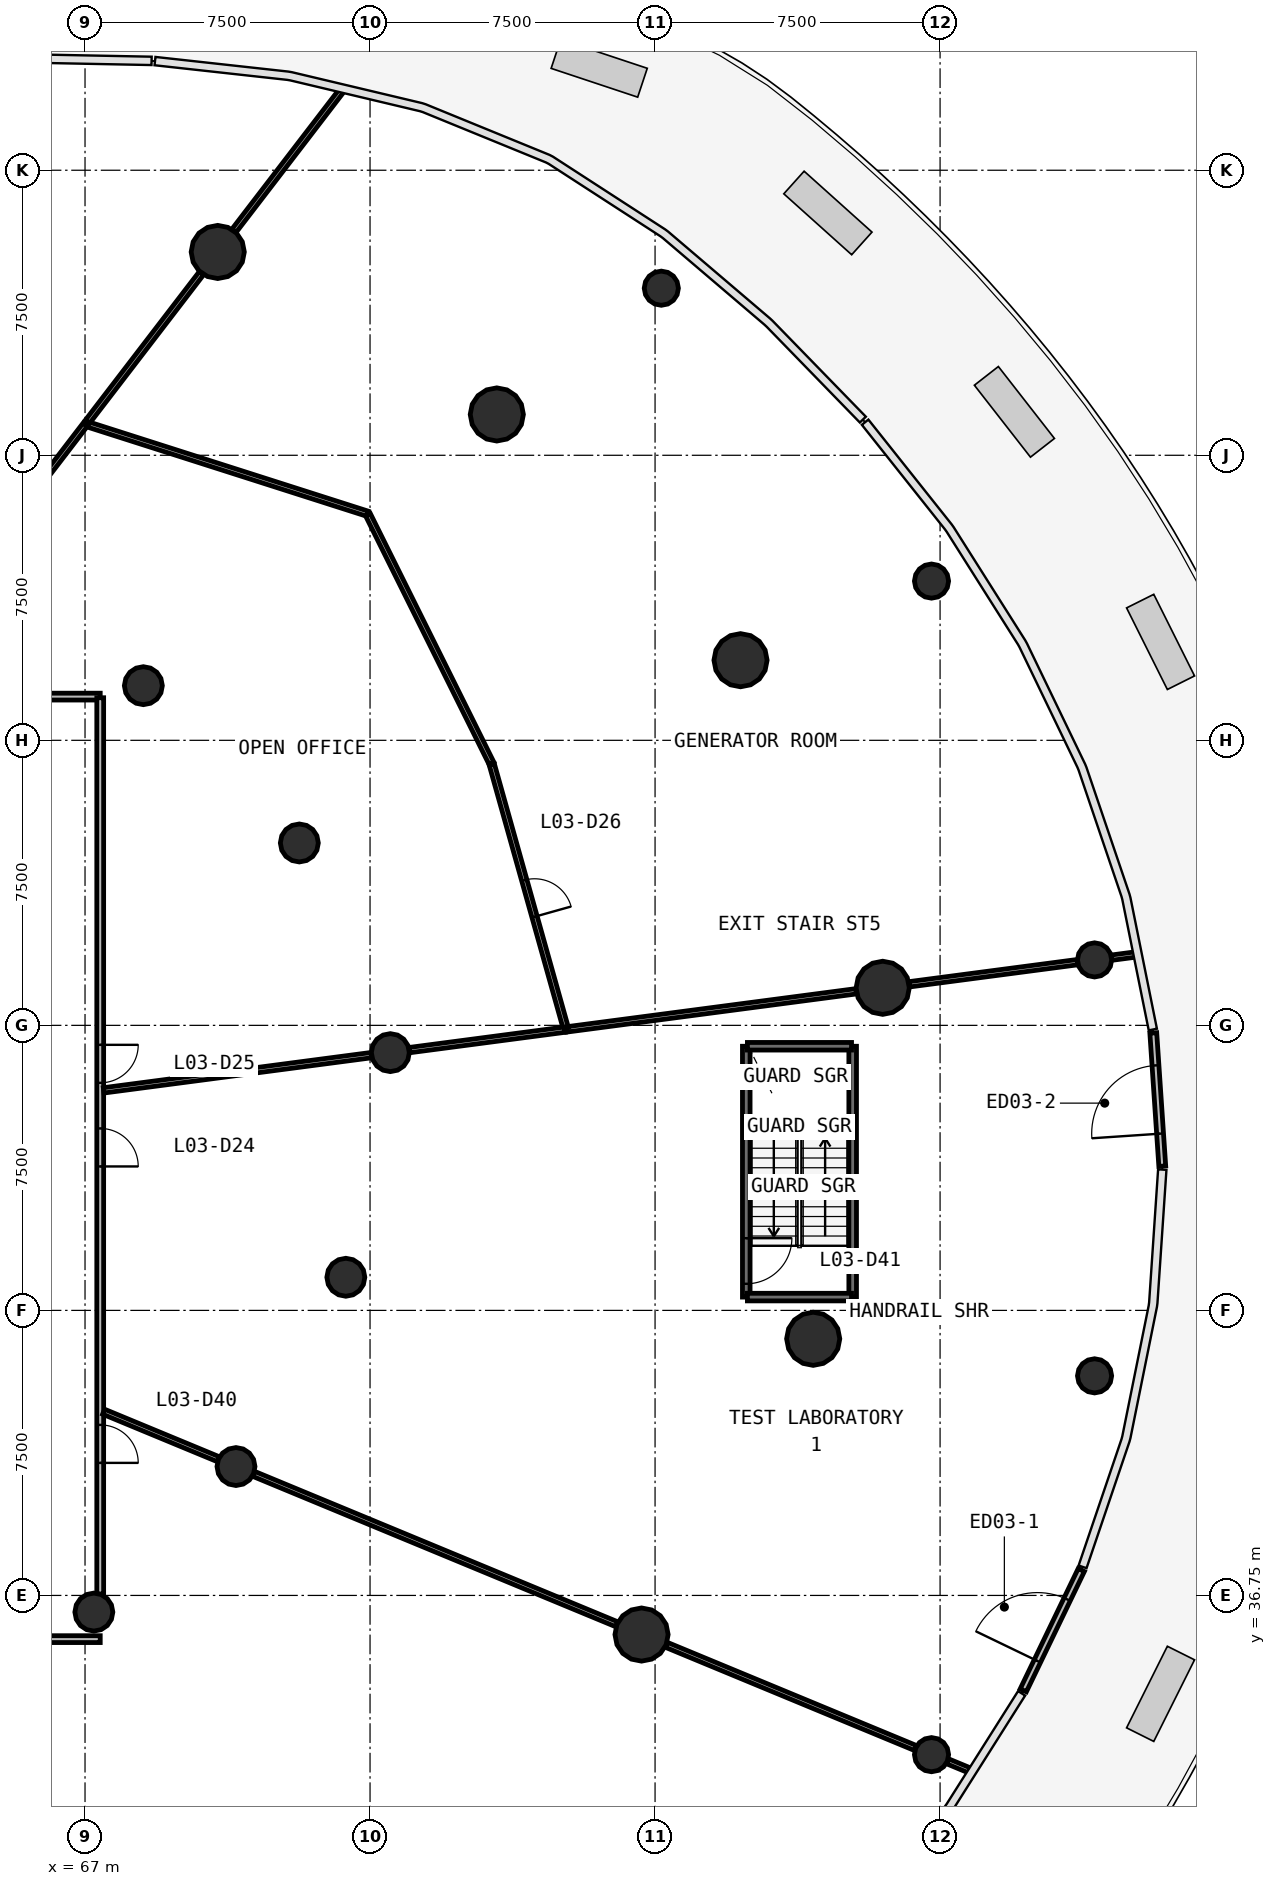
"""IFC4 building model, lengths in metres.
Left out: names, types, materials, properties, quantities, classifications, styles, units other than length and angle.
Written with IfcOpenShell. Run it as: python <this file> out.ifc"""

import sys

from ifc_helpers import new_model, si_unit, direction, frame, frame_2d, origin, origin_2d, place, context, subcontext, project, spatial, rectangle, circle, extrude, source, transform, mapped, element, fill, save


model = new_model("IFC4")
c1 = context("Model", 3, precision=1e-05, world=origin(), true_north=direction((0.0, 1.0)))
c2 = subcontext(c1, "Body", "Model", "MODEL_VIEW")
j1 = project(units=[si_unit("LENGTHUNIT", "METRE"), si_unit("PLANEANGLEUNIT", "RADIAN")], contexts=[c1])
p1 = place(None, origin())
s1 = spatial("IfcSite", under=j1, at=p1, CompositionType="ELEMENT")
p2 = place(p1, origin())
s2 = spatial("IfcBuilding", under=s1, at=p2, CompositionType="ELEMENT")
p3 = place(p2, frame((0.0, 0.0, 13.8)))
s3 = spatial("IfcBuildingStorey", under=s2, at=p3, CompositionType="ELEMENT", Elevation=13.8)
m1 = source(origin(), c2, "Body", "SweptSolid", [
    extrude(circle(Radius=0.7, at=origin_2d()), origin(), (0.0, 0.0, 1.0), 4.4),
])
for number, where, z_axis, x_axis in (
    (1, (87.99, 52.738, 0.0), (0.0, 0.0, 1.0), (1.0, 0.0, 0.0)),
    (2, (84.249, 61.358, 0.0), (0.0, 0.0, 1.0), (1.0, 0.0, 0.0)),
    (3, (77.836, 67.824, 0.0), (0.0, 0.0, 1.0), (1.0, 0.0, 0.0)),
    (4, (70.492, 72.1, 0.0), (0.0, 0.0, 1.0), (1.0, 0.0, 0.0)),
    (5, (81.645, 35.721, 0.0), (0.0, 0.0, 1.0), (1.0, 0.0, 0.0)),
    (6, (86.161, 43.503, 0.0), (0.0, 0.0, 1.0), (1.0, 0.0, 0.0)),
):
    element("IfcColumn", number, at=place(p3, frame(where, z_axis=z_axis, x_axis=x_axis)), inside=s3, PredefinedType="COLUMN", context=c2, shape_type="MappedRepresentation", body=[
        mapped(m1, transform((0.0, 0.0, 0.0), scale=1.0)),
    ])
m2 = source(origin(), c2, "Body", "SweptSolid", [
    extrude(circle(Radius=0.5, at=origin_2d()), origin(), (0.0, 0.0, 1.0), 4.4),
])
for number, where, z_axis, x_axis in (
    (7, (75.034, 51.032, 0.0), (0.0, 0.0, 1.0), (1.0, 0.0, 0.0)),
    (8, (72.639, 56.549, 0.0), (0.0, 0.0, 1.0), (1.0, 0.0, 0.0)),
    (9, (68.535, 60.688, 0.0), (0.0, 0.0, 1.0), (1.0, 0.0, 0.0)),
    (10, (67.232, 36.312, 0.0), (0.0, 0.0, 1.0), (1.0, 0.0, 0.0)),
    (11, (70.972, 40.141, 0.0), (0.0, 0.0, 1.0), (1.0, 0.0, 0.0)),
    (12, (73.863, 45.122, 0.0), (0.0, 0.0, 1.0), (1.0, 0.0, 0.0)),
):
    element("IfcColumn", number, at=place(p3, frame(where, z_axis=z_axis, x_axis=x_axis)), inside=s3, PredefinedType="COLUMN", context=c2, shape_type="MappedRepresentation", body=[
        mapped(m2, transform((0.0, 0.0, 0.0), scale=1.0)),
    ])
m3 = source(origin(), c2, "Body", "SweptSolid", [
    extrude(circle(Radius=0.45, at=origin_2d()), origin(), (0.0, 0.0, 1.0), 4.05),
])
for number, where, z_axis, x_axis in (
    (13, (93.565, 53.472, 0.0), (0.0, 0.0, 1.0), (1.0, 0.0, 0.0)),
    (14, (89.275, 63.44, 0.0), (0.0, 0.0, 1.0), (1.0, 0.0, 0.0)),
    (15, (82.165, 71.146, 0.0), (0.0, 0.0, 1.0), (1.0, 0.0, 0.0)),
    (16, (89.275, 32.56, 0.0), (0.0, 0.0, 1.0), (1.0, 0.0, 0.0)),
    (17, (93.565, 42.528, 0.0), (0.0, 0.0, 1.0), (1.0, 0.0, 0.0)),
):
    element("IfcColumn", number, at=place(p3, frame(where, z_axis=z_axis, x_axis=x_axis)), inside=s3, PredefinedType="COLUMN", context=c2, shape_type="MappedRepresentation", body=[
        mapped(m3, transform((0.0, 0.0, 0.0), scale=1.0)),
    ])
p4 = place(p3, frame((95.347, 48.045, 0.0), z_axis=(0.0, 0.0, 1.0), x_axis=(-0.06732600061, 0.99773103071, 0.0)))
e18 = element("IfcWall", 18, at=p4, inside=s3, PredefinedType="STANDARD", context=c2, shape_type="SweptSolid", body=[
    extrude(rectangle(XDim=3.514, YDim=0.18, at=frame_2d((1.757, 0.0))), origin(), (0.0, 0.0, 1.0), 4.05),
])
p5 = place(p4, frame((0.857, 0.0, 0.0)))
e19 = element("IfcOpeningElement", 19, at=p5, cuts=e18, PredefinedType="OPENING", context=c2, shape_type="SweptSolid", body=[
    extrude(rectangle(XDim=1.8, YDim=2.4, at=frame_2d((0.9, 1.2))), frame((0.0, 0.1, 0.0), z_axis=(0.0, -1.0, 0.0), x_axis=(1.0, 0.0, 0.0)), (0.0, 0.0, 1.0), 0.2),
])
p6 = place(p3, frame((91.689, 34.253, 0.0), z_axis=(0.0, 0.0, 1.0), x_axis=(0.434302205142, 0.900767225541, 0.0)))
e20 = element("IfcWall", 20, at=p6, inside=s3, PredefinedType="STANDARD", context=c2, shape_type="SweptSolid", body=[
    extrude(rectangle(XDim=3.515, YDim=0.18, at=frame_2d((1.757, 0.0))), origin(), (0.0, 0.0, 1.0), 4.05),
])
p7 = place(p6, frame((0.857, 0.0, 0.0)))
e21 = element("IfcOpeningElement", 21, at=p7, cuts=e20, PredefinedType="OPENING", context=c2, shape_type="SweptSolid", body=[
    extrude(rectangle(XDim=1.8, YDim=2.4, at=frame_2d((0.9, 1.2))), frame((0.0, 0.1, 0.0), z_axis=(0.0, -1.0, 0.0), x_axis=(1.0, 0.0, 0.0)), (0.0, 0.0, 1.0), 0.2),
])
p8 = place(p3, frame((87.2, 44.6, 0.0), z_axis=(0.0, 0.0, 1.0), x_axis=(0.0, 1.0, 0.0)))
e22 = element("IfcWall", 22, at=p8, inside=s3, PredefinedType="SOLIDWALL", context=c2, shape_type="SweptSolid", body=[
    extrude(rectangle(XDim=6.6, YDim=0.2, at=frame_2d((3.3, 0.0))), origin(), (0.0, 0.0, 1.0), 4.05),
])
p9 = place(p3, frame((84.4, 51.2, 0.0), z_axis=(0.0, 0.0, 1.0), x_axis=(0.0, -1.0, 0.0)))
e23 = element("IfcWall", 23, at=p9, inside=s3, PredefinedType="SOLIDWALL", context=c2, shape_type="SweptSolid", body=[
    extrude(rectangle(XDim=6.6, YDim=0.2, at=frame_2d((3.3, 0.0))), origin(), (0.0, 0.0, 1.0), 4.05),
])
p10 = place(p9, frame((5.05, 0.0, 0.0)))
e24 = element("IfcOpeningElement", 24, at=p10, cuts=e23, PredefinedType="OPENING", context=c2, shape_type="SweptSolid", body=[
    extrude(rectangle(XDim=1.2, YDim=2.1, at=frame_2d((0.6, 1.05))), frame((0.0, 0.11, 0.0), z_axis=(0.0, -1.0, 0.0), x_axis=(1.0, 0.0, 0.0)), (0.0, 0.0, 1.0), 0.22),
])
for number, where, z_axis, x_axis in (
    (25, (84.43, 44.6, 0.0), (0.0, 0.0, 1.0), (1.0, 0.0, 0.0)),
    (26, (87.17, 51.2, 0.0), (0.0, 0.0, 1.0), (-1.0, 0.0, 0.0)),
):
    element("IfcWall", number, at=place(p3, frame(where, z_axis=z_axis, x_axis=x_axis)), inside=s3, PredefinedType="SOLIDWALL", context=c2, shape_type="SweptSolid", body=[
        extrude(rectangle(XDim=2.74, YDim=0.2, at=frame_2d((1.37, 0.0))), origin(), (0.0, 0.0, 1.0), 4.05),
    ])
p11 = place(p3, frame((67.4, 35.6, 0.0), z_axis=(0.0, 0.0, 1.0), x_axis=(-1.0, 0.0, 0.0)))
e27 = element("IfcWall", 27, at=p11, inside=s3, PredefinedType="PARTITIONING", context=c2, shape_type="SweptSolid", body=[
    extrude(rectangle(XDim=30.8, YDim=0.18, at=frame_2d((15.4, 0.0))), origin(), (0.0, 0.0, 1.0), 3.25),
])
p12 = place(p11, frame((20.95, 0.0, 0.0)))
e28 = element("IfcOpeningElement", 28, at=p12, cuts=e27, PredefinedType="OPENING", context=c2, shape_type="SweptSolid", body=[
    extrude(rectangle(XDim=1.0, YDim=2.1, at=frame_2d((0.5, 1.05))), frame((0.0, 0.1, 0.0), z_axis=(0.0, -1.0, 0.0), x_axis=(1.0, 0.0, 0.0)), (0.0, 0.0, 1.0), 0.2),
])
p13 = place(p11, frame((17.35, 0.0, 0.0)))
e29 = element("IfcOpeningElement", 29, at=p13, cuts=e27, PredefinedType="OPENING", context=c2, shape_type="SweptSolid", body=[
    extrude(rectangle(XDim=1.0, YDim=2.1, at=frame_2d((0.5, 1.05))), frame((0.0, 0.1, 0.0), z_axis=(0.0, -1.0, 0.0), x_axis=(1.0, 0.0, 0.0)), (0.0, 0.0, 1.0), 0.2),
])
p14 = place(p11, frame((14.95, 0.0, 0.0)))
e30 = element("IfcOpeningElement", 30, at=p14, cuts=e27, PredefinedType="OPENING", context=c2, shape_type="SweptSolid", body=[
    extrude(rectangle(XDim=1.0, YDim=2.1, at=frame_2d((0.5, 1.05))), frame((0.0, 0.1, 0.0), z_axis=(0.0, -1.0, 0.0), x_axis=(1.0, 0.0, 0.0)), (0.0, 0.0, 1.0), 0.2),
])
p15 = place(p3, frame((36.6, 60.4, 0.0), z_axis=(0.0, 0.0, 1.0), x_axis=(1.0, 0.0, 0.0)))
e31 = element("IfcWall", 31, at=p15, inside=s3, PredefinedType="PARTITIONING", context=c2, shape_type="SweptSolid", body=[
    extrude(rectangle(XDim=30.8, YDim=0.18, at=frame_2d((15.4, 0.0))), origin(), (0.0, 0.0, 1.0), 3.25),
])
p16 = place(p15, frame((17.35, 0.0, 0.0)))
e32 = element("IfcOpeningElement", 32, at=p16, cuts=e31, PredefinedType="OPENING", context=c2, shape_type="SweptSolid", body=[
    extrude(rectangle(XDim=1.0, YDim=2.1, at=frame_2d((0.5, 1.05))), frame((0.0, 0.1, 0.0), z_axis=(0.0, -1.0, 0.0), x_axis=(1.0, 0.0, 0.0)), (0.0, 0.0, 1.0), 0.2),
])
p17 = place(p15, frame((14.85, 0.0, 0.0)))
e33 = element("IfcOpeningElement", 33, at=p17, cuts=e31, PredefinedType="OPENING", context=c2, shape_type="SweptSolid", body=[
    extrude(rectangle(XDim=0.9, YDim=2.1, at=frame_2d((0.45, 1.05))), frame((0.0, 0.1, 0.0), z_axis=(0.0, -1.0, 0.0), x_axis=(1.0, 0.0, 0.0)), (0.0, 0.0, 1.0), 0.2),
])
p18 = place(p15, frame((12.65, 0.0, 0.0)))
e34 = element("IfcOpeningElement", 34, at=p18, cuts=e31, PredefinedType="OPENING", context=c2, shape_type="SweptSolid", body=[
    extrude(rectangle(XDim=0.9, YDim=2.1, at=frame_2d((0.45, 1.05))), frame((0.0, 0.1, 0.0), z_axis=(0.0, -1.0, 0.0), x_axis=(1.0, 0.0, 0.0)), (0.0, 0.0, 1.0), 0.2),
])
p19 = place(p15, frame((8.95, 0.0, 0.0)))
e35 = element("IfcOpeningElement", 35, at=p19, cuts=e31, PredefinedType="OPENING", context=c2, shape_type="SweptSolid", body=[
    extrude(rectangle(XDim=1.0, YDim=2.1, at=frame_2d((0.5, 1.05))), frame((0.0, 0.1, 0.0), z_axis=(0.0, -1.0, 0.0), x_axis=(1.0, 0.0, 0.0)), (0.0, 0.0, 1.0), 0.2),
])
p20 = place(p3, frame((67.4, 60.37, 0.0), z_axis=(0.0, 0.0, 1.0), x_axis=(0.0, -1.0, 0.0)))
e36 = element("IfcWall", 36, at=p20, inside=s3, PredefinedType="PARTITIONING", context=c2, shape_type="SweptSolid", body=[
    extrude(rectangle(XDim=23.583, YDim=0.18, at=frame_2d((11.791, 0.0))), origin(), (0.0, 0.0, 1.0), 3.25),
])
p21 = place(p20, frame((11.333, 0.0, 0.0)))
e37 = element("IfcOpeningElement", 37, at=p21, cuts=e36, PredefinedType="OPENING", context=c2, shape_type="SweptSolid", body=[
    extrude(rectangle(XDim=1.0, YDim=2.1, at=frame_2d((0.5, 1.05))), frame((0.0, 0.1, 0.0), z_axis=(0.0, -1.0, 0.0), x_axis=(1.0, 0.0, 0.0)), (0.0, 0.0, 1.0), 0.2),
])
p22 = place(p20, frame((9.133, 0.0, 0.0)))
e38 = element("IfcOpeningElement", 38, at=p22, cuts=e36, PredefinedType="OPENING", context=c2, shape_type="SweptSolid", body=[
    extrude(rectangle(XDim=1.0, YDim=2.1, at=frame_2d((0.5, 1.05))), frame((0.0, 0.1, 0.0), z_axis=(0.0, -1.0, 0.0), x_axis=(1.0, 0.0, 0.0)), (0.0, 0.0, 1.0), 0.2),
])
p23 = place(p20, frame((19.133, 0.0, 0.0)))
e39 = element("IfcOpeningElement", 39, at=p23, cuts=e36, PredefinedType="OPENING", context=c2, shape_type="SweptSolid", body=[
    extrude(rectangle(XDim=1.0, YDim=2.1, at=frame_2d((0.5, 1.05))), frame((0.0, 0.1, 0.0), z_axis=(0.0, -1.0, 0.0), x_axis=(1.0, 0.0, 0.0)), (0.0, 0.0, 1.0), 0.2),
])
p24 = place(p3, frame((71.439, 39.948, 0.0), z_axis=(0.0, 0.0, 1.0), x_axis=(0.923874685699, -0.382695133396, 0.0)))
e40 = element("IfcWall", 40, at=p24, inside=s3, PredefinedType="PARTITIONING", context=c2, shape_type="SweptSolid", body=[
    extrude(rectangle(XDim=10.341, YDim=0.14, at=frame_2d((5.17, 0.0))), origin(), (0.0, 0.0, 1.0), 3.25),
])
p25 = place(p3, frame((63.441, 33.09, 0.0), z_axis=(0.0, 0.0, 1.0), x_axis=(0.608770769454, -0.793346173028, 0.0)))
e41 = element("IfcWall", 41, at=p25, inside=s3, PredefinedType="PARTITIONING", context=c2, shape_type="SweptSolid", body=[
    extrude(rectangle(XDim=9.079, YDim=0.14, at=frame_2d((4.54, 0.0))), origin(), (0.0, 0.0, 1.0), 3.25),
])
p26 = place(p3, frame((74.432, 65.213, 0.0), z_axis=(0.0, 0.0, 1.0), x_axis=(-0.952603673554, 0.304214136967, 0.0)))
e42 = element("IfcWall", 42, at=p26, inside=s3, PredefinedType="PARTITIONING", context=c2, shape_type="SweptSolid", body=[
    extrude(rectangle(XDim=7.777, YDim=0.14, at=frame_2d((3.889, 0.0))), origin(), (0.0, 0.0, 1.0), 3.25),
])
p27 = place(p3, frame((79.66, 51.642, 0.0), z_axis=(0.0, 0.0, 1.0), x_axis=(0.991446737275, 0.130511942543, 0.0)))
e43 = element("IfcWall", 43, at=p27, inside=s3, PredefinedType="PARTITIONING", context=c2, shape_type="SweptSolid", body=[
    extrude(rectangle(XDim=7.698, YDim=0.14, at=frame_2d((3.849, 0.0))), origin(), (0.0, 0.0, 1.0), 3.25),
])
p28 = place(p3, frame((77.696, 58.644, 0.0), z_axis=(0.0, 0.0, 1.0), x_axis=(-0.444912861123, 0.895573864071, 0.0)))
e44 = element("IfcWall", 44, at=p28, inside=s3, PredefinedType="PARTITIONING", context=c2, shape_type="SweptSolid", body=[
    extrude(rectangle(XDim=7.305, YDim=0.14, at=frame_2d((3.653, 0.0))), origin(), (0.0, 0.0, 1.0), 3.25),
])
p29 = place(p3, frame((77.704, 58.615, 0.0), z_axis=(0.0, 0.0, 1.0), x_axis=(0.27015344918, -0.9628172796, 0.0)))
e45 = element("IfcWall", 45, at=p29, inside=s3, PredefinedType="PARTITIONING", context=c2, shape_type="SweptSolid", body=[
    extrude(rectangle(XDim=7.212, YDim=0.14, at=frame_2d((3.606, 0.0))), origin(), (0.0, 0.0, 1.0), 3.25),
])
p30 = place(p29, frame((3.163, 0.0, 0.0)))
e46 = element("IfcOpeningElement", 46, at=p30, cuts=e45, PredefinedType="OPENING", context=c2, shape_type="SweptSolid", body=[
    extrude(rectangle(XDim=1.0, YDim=2.1, at=frame_2d((0.5, 1.05))), frame((0.0, 0.08, 0.0), z_axis=(0.0, -1.0, 0.0), x_axis=(1.0, 0.0, 0.0)), (0.0, 0.0, 1.0), 0.16),
])
p31 = place(p3, frame((67.49, 50.039, 0.0), z_axis=(0.0, 0.0, 1.0), x_axis=(0.99144622305, 0.130515848849, 0.0)))
e47 = element("IfcWall", 47, at=p31, inside=s3, PredefinedType="PARTITIONING", context=c2, shape_type="SweptSolid", body=[
    extrude(rectangle(XDim=7.104, YDim=0.14, at=frame_2d((3.552, 0.0))), origin(), (0.0, 0.0, 1.0), 3.25),
])
p32 = place(p3, frame((82.296, 35.451, 0.0), z_axis=(0.0, 0.0, 1.0), x_axis=(0.923879762642, -0.382682876779, 0.0)))
e48 = element("IfcWall", 48, at=p32, inside=s3, PredefinedType="PARTITIONING", context=c2, shape_type="SweptSolid", body=[
    extrude(rectangle(XDim=7.099, YDim=0.14, at=frame_2d((3.549, 0.0))), origin(), (0.0, 0.0, 1.0), 3.25),
])
p33 = place(p3, frame((67.069, 67.638, 0.0), z_axis=(0.0, 0.0, 1.0), x_axis=(0.608784649219, 0.793335522258, 0.0)))
e49 = element("IfcWall", 49, at=p33, inside=s3, PredefinedType="PARTITIONING", context=c2, shape_type="SweptSolid", body=[
    extrude(rectangle(XDim=4.92, YDim=0.14, at=frame_2d((2.46, 0.0))), origin(), (0.0, 0.0, 1.0), 3.25),
])
p34 = place(p3, frame((64.142, 63.824, 0.0), z_axis=(0.0, 0.0, 1.0), x_axis=(0.608759522286, 0.793354803368, 0.0)))
e50 = element("IfcWall", 50, at=p34, inside=s3, PredefinedType="PARTITIONING", context=c2, shape_type="SweptSolid", body=[
    extrude(rectangle(XDim=4.703, YDim=0.14, at=frame_2d((2.352, 0.0))), origin(), (0.0, 0.0, 1.0), 3.25),
])
p35 = place(p3, frame((70.921, 72.658, 0.0), z_axis=(0.0, 0.0, 1.0), x_axis=(0.608770448494, 0.793346419315, 0.0)))
e51 = element("IfcWall", 51, at=p35, inside=s3, PredefinedType="PARTITIONING", context=c2, shape_type="SweptSolid", body=[
    extrude(rectangle(XDim=4.657, YDim=0.14, at=frame_2d((2.329, 0.0))), origin(), (0.0, 0.0, 1.0), 3.25),
])
p36 = place(p3, frame((88.689, 52.83, 0.0), z_axis=(0.0, 0.0, 1.0), x_axis=(0.991442937185, 0.130540807053, 0.0)))
e52 = element("IfcWall", 52, at=p36, inside=s3, PredefinedType="PARTITIONING", context=c2, shape_type="SweptSolid", body=[
    extrude(rectangle(XDim=4.464, YDim=0.14, at=frame_2d((2.232, 0.0))), origin(), (0.0, 0.0, 1.0), 3.25),
])
p37 = place(p3, frame((75.534, 51.098, 0.0), z_axis=(0.0, 0.0, 1.0), x_axis=(0.99144685344, 0.130511060083, 0.0)))
e53 = element("IfcWall", 53, at=p37, inside=s3, PredefinedType="PARTITIONING", context=c2, shape_type="SweptSolid", body=[
    extrude(rectangle(XDim=4.132, YDim=0.14, at=frame_2d((2.066, 0.0))), origin(), (0.0, 0.0, 1.0), 3.25),
])
p38 = place(p3, frame((67.49, 41.584, 0.0), z_axis=(0.0, 0.0, 1.0), x_axis=(0.923911109142, -0.382607190737, 0.0)))
e54 = element("IfcWall", 54, at=p38, inside=s3, PredefinedType="PARTITIONING", context=c2, shape_type="SweptSolid", body=[
    extrude(rectangle(XDim=3.264, YDim=0.14, at=frame_2d((1.632, 0.0))), origin(), (0.0, 0.0, 1.0), 3.25),
])
p39 = place(p3, frame((94.016, 53.531, 0.0), z_axis=(0.0, 0.0, 1.0), x_axis=(0.991428116695, 0.130653317704, 0.0)))
e55 = element("IfcWall", 55, at=p39, inside=s3, PredefinedType="PARTITIONING", context=c2, shape_type="SweptSolid", body=[
    extrude(rectangle(XDim=0.635, YDim=0.14, at=frame_2d((0.318, 0.0))), origin(), (0.0, 0.0, 1.0), 3.25),
])
p40 = place(p3, frame((89.695, 32.386, 0.0), z_axis=(0.0, 0.0, 1.0), x_axis=(0.923885189929, -0.382669773866, 0.0)))
e56 = element("IfcWall", 56, at=p40, inside=s3, PredefinedType="PARTITIONING", context=c2, shape_type="SweptSolid", body=[
    extrude(rectangle(XDim=0.633, YDim=0.14, at=frame_2d((0.316, 0.0))), origin(), (0.0, 0.0, 1.0), 3.25),
])
m4 = source(origin(), c2, "Body", "SweptSolid", [
    extrude(rectangle(XDim=1.8, YDim=2.4, at=frame_2d((0.9, 1.2))), frame((0.0, 0.025, 0.0), z_axis=(0.0, -1.0, 0.0), x_axis=(1.0, 0.0, 0.0)), (0.0, 0.0, 1.0), 0.05),
])
p41 = place(p5, origin())
e57 = element("IfcDoor", 57, at=p41, inside=s3, OperationType="DOUBLE_DOOR_SINGLE_SWING", PredefinedType="DOOR", context=c2, shape_type="MappedRepresentation", body=[
    mapped(m4, transform((0.0, 0.0, 0.0), scale=1.0)),
])
fill(e19, e57)
p42 = place(p7, origin())
e58 = element("IfcDoor", 58, at=p42, inside=s3, OperationType="DOUBLE_DOOR_SINGLE_SWING", PredefinedType="DOOR", context=c2, shape_type="MappedRepresentation", body=[
    mapped(m4, transform((0.0, 0.0, 0.0), scale=1.0)),
])
fill(e21, e58)
m5 = source(origin(), c2, "Body", "SweptSolid", [
    extrude(rectangle(XDim=1.0, YDim=2.1, at=frame_2d((0.5, 1.05))), frame((0.0, 0.025, 0.0), z_axis=(0.0, -1.0, 0.0), x_axis=(1.0, 0.0, 0.0)), (0.0, 0.0, 1.0), 0.05),
])
p43 = place(p21, origin())
e59 = element("IfcDoor", 59, at=p43, inside=s3, OperationType="SINGLE_SWING_RIGHT", PredefinedType="DOOR", context=c2, shape_type="MappedRepresentation", body=[
    mapped(m5, transform((0.0, 0.0, 0.0), scale=1.0)),
])
fill(e37, e59)
p44 = place(p22, origin())
e60 = element("IfcDoor", 60, at=p44, inside=s3, OperationType="SINGLE_SWING_LEFT", PredefinedType="DOOR", context=c2, shape_type="MappedRepresentation", body=[
    mapped(m5, transform((0.0, 0.0, 0.0), scale=1.0)),
])
fill(e38, e60)
p45 = place(p30, origin())
e61 = element("IfcDoor", 61, at=p45, inside=s3, OperationType="SINGLE_SWING_RIGHT", PredefinedType="DOOR", context=c2, shape_type="MappedRepresentation", body=[
    mapped(m5, transform((0.0, 0.0, 0.0), scale=1.0)),
])
fill(e46, e61)
p46 = place(p23, origin())
e62 = element("IfcDoor", 62, at=p46, inside=s3, OperationType="SINGLE_SWING_RIGHT", PredefinedType="DOOR", context=c2, shape_type="MappedRepresentation", body=[
    mapped(m5, transform((0.0, 0.0, 0.0), scale=1.0)),
])
fill(e39, e62)
m6 = source(origin(), c2, "Body", "SweptSolid", [
    extrude(rectangle(XDim=1.2, YDim=2.1, at=frame_2d((0.6, 1.05))), frame((0.0, 0.025, 0.0), z_axis=(0.0, -1.0, 0.0), x_axis=(1.0, 0.0, 0.0)), (0.0, 0.0, 1.0), 0.05),
])
p47 = place(p10, origin())
e63 = element("IfcDoor", 63, at=p47, inside=s3, OperationType="SINGLE_SWING_LEFT", PredefinedType="DOOR", context=c2, shape_type="MappedRepresentation", body=[
    mapped(m6, transform((0.0, 0.0, 0.0), scale=1.0)),
])
fill(e24, e63)
save(model, sys.argv[1])
